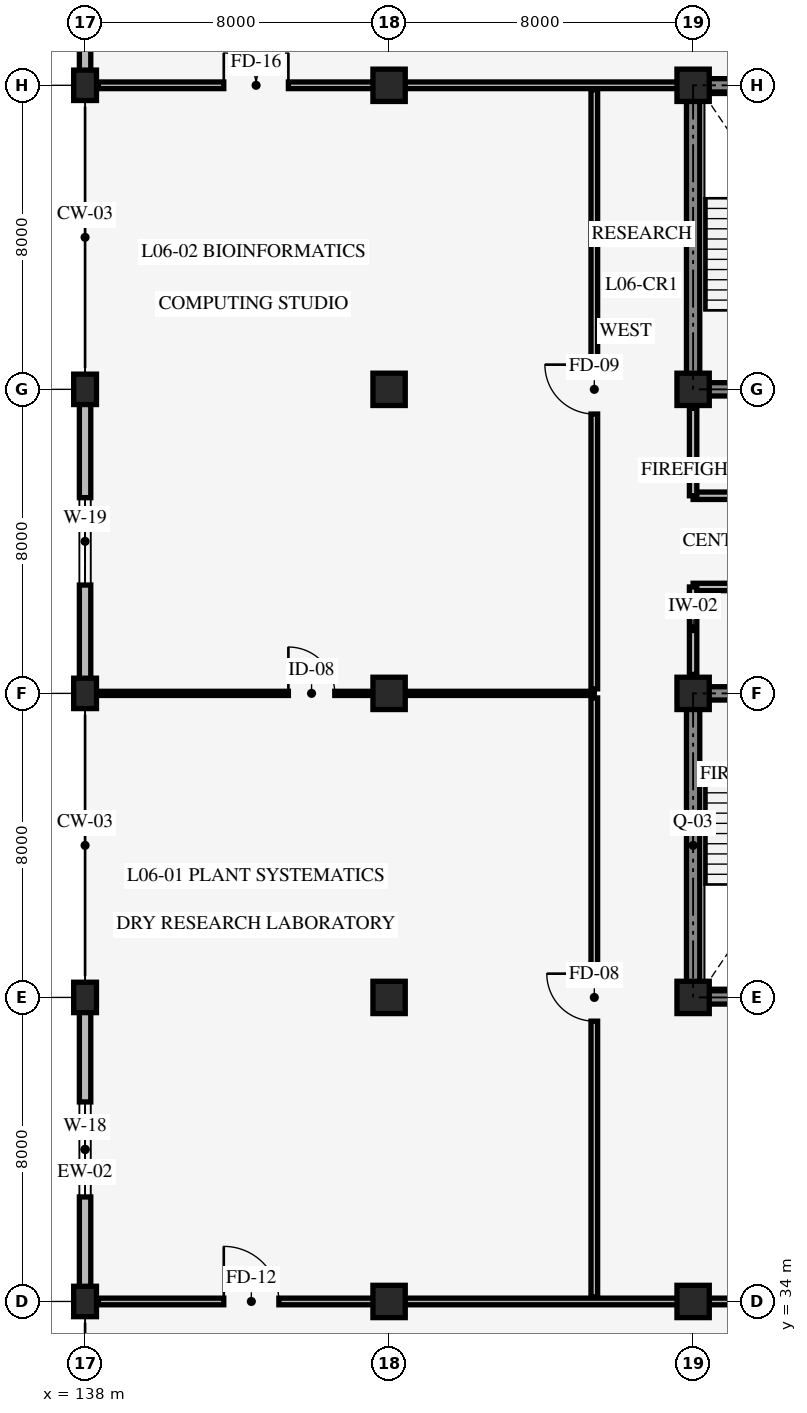
"""IFC4 building model, lengths in metres.
Left out: names, types, materials, properties, quantities, classifications, styles, units other than length and angle.
Written with IfcOpenShell. Run it as: python <this file> out.ifc"""

import sys

from ifc_helpers import new_model, si_unit, direction, frame, frame_2d, origin, origin_2d, place, context, subcontext, project, spatial, rectangle, extrude, element, fill, save


model = new_model("IFC4")
c1 = context("Model", 3, precision=1e-05, world=origin(), true_north=direction((0.0, 1.0)))
c2 = subcontext(c1, "Body", "Model", "MODEL_VIEW")
j1 = project(units=[si_unit("LENGTHUNIT", "METRE"), si_unit("PLANEANGLEUNIT", "RADIAN")], contexts=[c1])
p1 = place(None, origin())
s1 = spatial("IfcSite", under=j1, at=p1, CompositionType="ELEMENT")
p2 = place(p1, origin())
s2 = spatial("IfcBuilding", under=s1, at=p2, CompositionType="ELEMENT")
p3 = place(p2, frame((0.0, 0.0, 23.4)))
s3 = spatial("IfcBuildingStorey", under=s2, at=p3, CompositionType="ELEMENT", Elevation=23.4)
p4 = place(p3, frame((154.0, 42.0, 0.0), z_axis=(0.0, 0.0, 1.0), x_axis=(1.0, 0.0, 0.0)))
e1 = element("IfcWall", 1, at=p4, inside=s3, PredefinedType="SHEAR", context=c2, shape_type="SweptSolid", body=[
    extrude(rectangle(XDim=8.0, YDim=0.35, at=frame_2d((4.0, 0.0))), origin(), (0.0, 0.0, 1.0), 3.95),
])
p5 = place(p3, frame((162.0, 50.0, 0.0), z_axis=(0.0, 0.0, 1.0), x_axis=(-1.0, 0.0, 0.0)))
e2 = element("IfcWall", 2, at=p5, inside=s3, PredefinedType="SHEAR", context=c2, shape_type="SweptSolid", body=[
    extrude(rectangle(XDim=8.0, YDim=0.35, at=frame_2d((4.0, 0.0))), origin(), (0.0, 0.0, 1.0), 3.95),
])
p6 = place(p5, frame((5.3, 0.0, 0.0)))
e3 = element("IfcOpeningElement", 3, at=p6, cuts=e2, PredefinedType="OPENING", context=c2, shape_type="SweptSolid", body=[
    extrude(rectangle(XDim=1.3, YDim=2.15, at=frame_2d((0.65, 1.075))), frame((0.0, 0.185, 0.0), z_axis=(0.0, -1.0, 0.0), x_axis=(1.0, 0.0, 0.0)), (0.0, 0.0, 1.0), 0.37),
])
p7 = place(p5, frame((1.45, 0.0, 0.0)))
e4 = element("IfcOpeningElement", 4, at=p7, cuts=e2, PredefinedType="OPENING", context=c2, shape_type="SweptSolid", body=[
    extrude(rectangle(XDim=1.1, YDim=2.2, at=frame_2d((0.55, 1.1))), frame((0.0, 0.185, 0.0), z_axis=(0.0, -1.0, 0.0), x_axis=(1.0, 0.0, 0.0)), (0.0, 0.0, 1.0), 0.37),
])
p8 = place(p3, frame((154.0, 50.0, 0.0), z_axis=(0.0, 0.0, 1.0), x_axis=(0.0, -1.0, 0.0)))
e5 = element("IfcWall", 5, at=p8, inside=s3, PredefinedType="SHEAR", context=c2, shape_type="SweptSolid", body=[
    extrude(rectangle(XDim=8.0, YDim=0.35, at=frame_2d((4.0, 0.0))), origin(), (0.0, 0.0, 1.0), 3.95),
])
p9 = place(p3, frame((154.0, 58.0, 0.0), z_axis=(0.0, 0.0, 1.0), x_axis=(1.0, 0.0, 0.0)))
e6 = element("IfcWall", 6, at=p9, inside=s3, PredefinedType="SHEAR", context=c2, shape_type="SweptSolid", body=[
    extrude(rectangle(XDim=8.0, YDim=0.35, at=frame_2d((4.0, 0.0))), origin(), (0.0, 0.0, 1.0), 3.95),
])
p10 = place(p9, frame((1.4, 0.0, 0.0)))
e7 = element("IfcOpeningElement", 7, at=p10, cuts=e6, PredefinedType="OPENING", context=c2, shape_type="SweptSolid", body=[
    extrude(rectangle(XDim=1.3, YDim=2.15, at=frame_2d((0.65, 1.075))), frame((0.0, 0.185, 0.0), z_axis=(0.0, -1.0, 0.0), x_axis=(1.0, 0.0, 0.0)), (0.0, 0.0, 1.0), 0.37),
])
p11 = place(p9, frame((5.3, 0.0, 0.0)))
e8 = element("IfcOpeningElement", 8, at=p11, cuts=e6, PredefinedType="OPENING", context=c2, shape_type="SweptSolid", body=[
    extrude(rectangle(XDim=1.1, YDim=2.2, at=frame_2d((0.55, 1.1))), frame((0.0, 0.185, 0.0), z_axis=(0.0, -1.0, 0.0), x_axis=(1.0, 0.0, 0.0)), (0.0, 0.0, 1.0), 0.37),
])
for number, where, z_axis, x_axis in (
    (9, (162.0, 66.0, 0.0), (0.0, 0.0, 1.0), (-1.0, 0.0, 0.0)),
    (10, (154.0, 66.0, 0.0), (0.0, 0.0, 1.0), (0.0, -1.0, 0.0)),
):
    element("IfcWall", number, at=place(p3, frame(where, z_axis=z_axis, x_axis=x_axis)), inside=s3, PredefinedType="SHEAR", context=c2, shape_type="SweptSolid", body=[
        extrude(rectangle(XDim=8.0, YDim=0.35, at=frame_2d((4.0, 0.0))), origin(), (0.0, 0.0, 1.0), 3.95),
    ])
for number, where, z_axis, x_axis in (
    (11, (138.0, 34.0, 0.0), (0.0, 0.0, 1.0), (1.0, 0.0, 0.0)),
    (12, (138.0, 42.0, 0.0), (0.0, 0.0, 1.0), (1.0, 0.0, 0.0)),
    (13, (138.0, 50.0, 0.0), (0.0, 0.0, 1.0), (1.0, 0.0, 0.0)),
    (14, (138.0, 58.0, 0.0), (0.0, 0.0, 1.0), (1.0, 0.0, 0.0)),
    (15, (138.0, 66.0, 0.0), (0.0, 0.0, 1.0), (1.0, 0.0, 0.0)),
):
    element("IfcColumn", number, at=place(p3, frame(where, z_axis=z_axis, x_axis=x_axis)), inside=s3, PredefinedType="COLUMN", context=c2, shape_type="SweptSolid", body=[
        extrude(rectangle(XDim=0.6, YDim=0.8, at=origin_2d()), origin(), (0.0, 0.0, 1.0), 4.2),
    ])
for number, where, z_axis, x_axis in (
    (16, (146.0, 34.0, 0.0), (0.0, 0.0, 1.0), (1.0, 0.0, 0.0)),
    (17, (146.0, 42.0, 0.0), (0.0, 0.0, 1.0), (1.0, 0.0, 0.0)),
    (18, (146.0, 50.0, 0.0), (0.0, 0.0, 1.0), (1.0, 0.0, 0.0)),
    (19, (146.0, 58.0, 0.0), (0.0, 0.0, 1.0), (1.0, 0.0, 0.0)),
    (20, (146.0, 66.0, 0.0), (0.0, 0.0, 1.0), (1.0, 0.0, 0.0)),
    (21, (154.0, 34.0, 0.0), (0.0, 0.0, 1.0), (1.0, 0.0, 0.0)),
    (22, (154.0, 42.0, 0.0), (0.0, 0.0, 1.0), (1.0, 0.0, 0.0)),
    (23, (154.0, 50.0, 0.0), (0.0, 0.0, 1.0), (1.0, 0.0, 0.0)),
    (24, (154.0, 58.0, 0.0), (0.0, 0.0, 1.0), (1.0, 0.0, 0.0)),
    (25, (154.0, 66.0, 0.0), (0.0, 0.0, 1.0), (1.0, 0.0, 0.0)),
):
    element("IfcColumn", number, at=place(p3, frame(where, z_axis=z_axis, x_axis=x_axis)), inside=s3, PredefinedType="COLUMN", context=c2, shape_type="SweptSolid", body=[
        extrude(rectangle(XDim=0.85, YDim=0.85, at=origin_2d()), origin(), (0.0, 0.0, 1.0), 4.2),
    ])
p12 = place(p3, frame((138.0, 34.0, 0.0), z_axis=(0.0, 0.0, 1.0), x_axis=(0.0, 1.0, 0.0)))
e26 = element("IfcWall", 26, at=p12, inside=s3, PredefinedType="STANDARD", context=c2, shape_type="SweptSolid", body=[
    extrude(rectangle(XDim=8.0, YDim=0.3, at=frame_2d((4.0, 0.0))), origin(), (0.0, 0.0, 1.0), 3.19),
])
p13 = place(p12, frame((2.75, 0.0, 0.85)))
e27 = element("IfcOpeningElement", 27, at=p13, cuts=e26, PredefinedType="OPENING", context=c2, shape_type="SweptSolid", body=[
    extrude(rectangle(XDim=2.5, YDim=1.8, at=frame_2d((1.25, 0.9))), frame((0.0, 0.16, 0.0), z_axis=(0.0, -1.0, 0.0), x_axis=(1.0, 0.0, 0.0)), (0.0, 0.0, 1.0), 0.32),
])
p14 = place(p3, frame((138.0, 50.0, 0.0), z_axis=(0.0, 0.0, 1.0), x_axis=(0.0, 1.0, 0.0)))
e28 = element("IfcWall", 28, at=p14, inside=s3, PredefinedType="STANDARD", context=c2, shape_type="SweptSolid", body=[
    extrude(rectangle(XDim=8.0, YDim=0.3, at=frame_2d((4.0, 0.0))), origin(), (0.0, 0.0, 1.0), 3.19),
])
p15 = place(p14, frame((2.85, 0.0, 0.85)))
e29 = element("IfcOpeningElement", 29, at=p15, cuts=e28, PredefinedType="OPENING", context=c2, shape_type="SweptSolid", body=[
    extrude(rectangle(XDim=2.3, YDim=1.5, at=frame_2d((1.15, 0.75))), frame((0.0, 0.16, 0.0), z_axis=(0.0, -1.0, 0.0), x_axis=(1.0, 0.0, 0.0)), (0.0, 0.0, 1.0), 0.32),
])
p16 = place(p3, frame((138.0, 66.0, 0.0), z_axis=(0.0, 0.0, 1.0), x_axis=(0.0, 1.0, 0.0)))
e30 = element("IfcWall", 30, at=p16, inside=s3, PredefinedType="STANDARD", context=c2, shape_type="SweptSolid", body=[
    extrude(rectangle(XDim=8.0, YDim=0.3, at=frame_2d((4.0, 0.0))), origin(), (0.0, 0.0, 1.0), 3.19),
])
p17 = place(p16, frame((2.65, 0.0, 0.85)))
e31 = element("IfcOpeningElement", 31, at=p17, cuts=e30, PredefinedType="OPENING", context=c2, shape_type="SweptSolid", body=[
    extrude(rectangle(XDim=2.7, YDim=1.8, at=frame_2d((1.35, 0.9))), frame((0.0, 0.16, 0.0), z_axis=(0.0, -1.0, 0.0), x_axis=(1.0, 0.0, 0.0)), (0.0, 0.0, 1.0), 0.32),
])
p18 = place(p3, frame((154.0, 52.8, 0.0), z_axis=(0.0, 0.0, 1.0), x_axis=(1.0, 0.0, 0.0)))
e32 = element("IfcWall", 32, at=p18, inside=s3, PredefinedType="STANDARD", context=c2, shape_type="SweptSolid", body=[
    extrude(rectangle(XDim=7.6, YDim=0.195, at=frame_2d((3.8, 0.0))), origin(), (0.0, 0.0, 1.0), 3.9),
])
p19 = place(p18, frame((2.8, 0.0, 0.0)))
e33 = element("IfcOpeningElement", 33, at=p19, cuts=e32, PredefinedType="OPENING", context=c2, shape_type="SweptSolid", body=[
    extrude(rectangle(XDim=1.2, YDim=2.1, at=frame_2d((0.6, 1.05))), frame((0.0, 0.107, 0.0), z_axis=(0.0, -1.0, 0.0), x_axis=(1.0, 0.0, 0.0)), (0.0, 0.0, 1.0), 0.215),
])
p20 = place(p3, frame((154.0, 50.5, 0.0), z_axis=(0.0, 0.0, 1.0), x_axis=(0.0, 1.0, 0.0)))
e34 = element("IfcWall", 34, at=p20, inside=s3, PredefinedType="STANDARD", context=c2, shape_type="SweptSolid", body=[
    extrude(rectangle(XDim=2.3, YDim=0.195, at=frame_2d((1.15, 0.0))), origin(), (0.0, 0.0, 1.0), 3.19),
])
p21 = place(p3, frame((154.0, 55.2, 0.0), z_axis=(0.0, 0.0, 1.0), x_axis=(1.0, 0.0, 0.0)))
e35 = element("IfcWall", 35, at=p21, inside=s3, PredefinedType="STANDARD", context=c2, shape_type="SweptSolid", body=[
    extrude(rectangle(XDim=7.6, YDim=0.195, at=frame_2d((3.8, 0.0))), origin(), (0.0, 0.0, 1.0), 3.9),
])
p22 = place(p21, frame((2.8, 0.0, 0.0)))
e36 = element("IfcOpeningElement", 36, at=p22, cuts=e35, PredefinedType="OPENING", context=c2, shape_type="SweptSolid", body=[
    extrude(rectangle(XDim=1.3, YDim=2.15, at=frame_2d((0.65, 1.075))), frame((0.0, 0.107, 0.0), z_axis=(0.0, -1.0, 0.0), x_axis=(1.0, 0.0, 0.0)), (0.0, 0.0, 1.0), 0.215),
])
p23 = place(p3, frame((154.0, 55.2, 0.0), z_axis=(0.0, 0.0, 1.0), x_axis=(0.0, 1.0, 0.0)))
e37 = element("IfcWall", 37, at=p23, inside=s3, PredefinedType="STANDARD", context=c2, shape_type="SweptSolid", body=[
    extrude(rectangle(XDim=2.3, YDim=0.195, at=frame_2d((1.15, 0.0))), origin(), (0.0, 0.0, 1.0), 3.19),
])
p24 = place(p3, frame((151.4, 34.12, 0.0), z_axis=(0.0, 0.0, 1.0), x_axis=(0.0, 1.0, 0.0)))
e38 = element("IfcWall", 38, at=p24, inside=s3, PredefinedType="STANDARD", context=c2, shape_type="SweptSolid", body=[
    extrude(rectangle(XDim=15.76, YDim=0.175, at=frame_2d((7.88, 0.0))), origin(), (0.0, 0.0, 1.0), 3.9),
])
p25 = place(p24, frame((7.255, 0.0, 0.0)))
e39 = element("IfcOpeningElement", 39, at=p25, cuts=e38, PredefinedType="OPENING", context=c2, shape_type="SweptSolid", body=[
    extrude(rectangle(XDim=1.25, YDim=2.15, at=frame_2d((0.625, 1.075))), frame((0.0, 0.098, 0.0), z_axis=(0.0, -1.0, 0.0), x_axis=(1.0, 0.0, 0.0)), (0.0, 0.0, 1.0), 0.195),
])
p26 = place(p3, frame((138.12, 50.0, 0.0), z_axis=(0.0, 0.0, 1.0), x_axis=(1.0, 0.0, 0.0)))
e40 = element("IfcWall", 40, at=p26, inside=s3, PredefinedType="STANDARD", context=c2, shape_type="SweptSolid", body=[
    extrude(rectangle(XDim=13.28, YDim=0.11, at=frame_2d((6.64, 0.0))), origin(), (0.0, 0.0, 1.0), 3.14),
])
p27 = place(p26, frame((5.23, 0.0, 0.0)))
e41 = element("IfcOpeningElement", 41, at=p27, cuts=e40, PredefinedType="OPENING", context=c2, shape_type="SweptSolid", body=[
    extrude(rectangle(XDim=1.22, YDim=2.14, at=frame_2d((0.61, 1.07))), frame((0.0, 0.065, 0.0), z_axis=(0.0, -1.0, 0.0), x_axis=(1.0, 0.0, 0.0)), (0.0, 0.0, 1.0), 0.13),
])
p28 = place(p3, frame((151.4, 50.12, 0.0), z_axis=(0.0, 0.0, 1.0), x_axis=(0.0, 1.0, 0.0)))
e42 = element("IfcWall", 42, at=p28, inside=s3, PredefinedType="STANDARD", context=c2, shape_type="SweptSolid", body=[
    extrude(rectangle(XDim=15.76, YDim=0.175, at=frame_2d((7.88, 0.0))), origin(), (0.0, 0.0, 1.0), 3.9),
])
p29 = place(p28, frame((7.23, 0.0, 0.0)))
e43 = element("IfcOpeningElement", 43, at=p29, cuts=e42, PredefinedType="OPENING", context=c2, shape_type="SweptSolid", body=[
    extrude(rectangle(XDim=1.3, YDim=2.15, at=frame_2d((0.65, 1.075))), frame((0.0, 0.098, 0.0), z_axis=(0.0, -1.0, 0.0), x_axis=(1.0, 0.0, 0.0)), (0.0, 0.0, 1.0), 0.195),
])
p30 = place(p3, frame((138.35, 34.0, 0.0), z_axis=(0.0, 0.0, 1.0), x_axis=(1.0, 0.0, 0.0)))
e44 = element("IfcWall", 44, at=p30, inside=s3, PredefinedType="STANDARD", context=c2, shape_type="SweptSolid", body=[
    extrude(rectangle(XDim=23.3, YDim=0.175, at=frame_2d((11.65, 0.0))), origin(), (0.0, 0.0, 1.0), 3.14),
])
p31 = place(p30, frame((3.3, 0.0, 0.0)))
e45 = element("IfcOpeningElement", 45, at=p31, cuts=e44, PredefinedType="OPENING", context=c2, shape_type="SweptSolid", body=[
    extrude(rectangle(XDim=1.45, YDim=2.2, at=frame_2d((0.725, 1.1))), frame((0.0, 0.098, 0.0), z_axis=(0.0, -1.0, 0.0), x_axis=(1.0, 0.0, 0.0)), (0.0, 0.0, 1.0), 0.195),
])
p32 = place(p3, frame((138.35, 66.0, 0.0), z_axis=(0.0, 0.0, 1.0), x_axis=(1.0, 0.0, 0.0)))
e46 = element("IfcWall", 46, at=p32, inside=s3, PredefinedType="STANDARD", context=c2, shape_type="SweptSolid", body=[
    extrude(rectangle(XDim=15.3, YDim=0.175, at=frame_2d((7.65, 0.0))), origin(), (0.0, 0.0, 1.0), 3.14),
])
p33 = place(p32, frame((3.3, 0.0, 0.0)))
e47 = element("IfcOpeningElement", 47, at=p33, cuts=e46, PredefinedType="OPENING", context=c2, shape_type="SweptSolid", body=[
    extrude(rectangle(XDim=1.7, YDim=2.3, at=frame_2d((0.85, 1.15))), frame((0.0, 0.098, 0.0), z_axis=(0.0, -1.0, 0.0), x_axis=(1.0, 0.0, 0.0)), (0.0, 0.0, 1.0), 0.195),
])
p34 = place(p13, origin())
e48 = element("IfcWindow", 48, at=p34, inside=s3, PartitioningType="SINGLE_PANEL", PredefinedType="WINDOW", context=c2, shape_type="SweptSolid", body=[
    extrude(rectangle(XDim=2.5, YDim=1.8, at=frame_2d((1.25, 0.9))), frame((0.0, 0.03, 0.0), z_axis=(0.0, -1.0, 0.0), x_axis=(1.0, 0.0, 0.0)), (0.0, 0.0, 1.0), 0.06),
])
fill(e27, e48)
p35 = place(p15, origin())
e49 = element("IfcWindow", 49, at=p35, inside=s3, PartitioningType="SINGLE_PANEL", PredefinedType="WINDOW", context=c2, shape_type="SweptSolid", body=[
    extrude(rectangle(XDim=2.3, YDim=1.5, at=frame_2d((1.15, 0.75))), frame((0.0, 0.03, 0.0), z_axis=(0.0, -1.0, 0.0), x_axis=(1.0, 0.0, 0.0)), (0.0, 0.0, 1.0), 0.06),
])
fill(e29, e49)
p36 = place(p25, origin())
e50 = element("IfcDoor", 50, at=p36, inside=s3, OperationType="SINGLE_SWING_RIGHT", PredefinedType="DOOR", context=c2, shape_type="SweptSolid", body=[
    extrude(rectangle(XDim=1.25, YDim=2.15, at=frame_2d((0.625, 1.075))), frame((0.0, 0.025, 0.0), z_axis=(0.0, -1.0, 0.0), x_axis=(1.0, 0.0, 0.0)), (0.0, 0.0, 1.0), 0.05),
])
fill(e39, e50)
p37 = place(p27, origin())
e51 = element("IfcDoor", 51, at=p37, inside=s3, OperationType="SINGLE_SWING_LEFT", PredefinedType="DOOR", context=c2, shape_type="SweptSolid", body=[
    extrude(rectangle(XDim=1.22, YDim=2.14, at=frame_2d((0.61, 1.07))), frame((0.0, 0.025, 0.0), z_axis=(0.0, -1.0, 0.0), x_axis=(1.0, 0.0, 0.0)), (0.0, 0.0, 1.0), 0.05),
])
fill(e41, e51)
p38 = place(p29, origin())
e52 = element("IfcDoor", 52, at=p38, inside=s3, OperationType="SINGLE_SWING_RIGHT", PredefinedType="DOOR", context=c2, shape_type="SweptSolid", body=[
    extrude(rectangle(XDim=1.3, YDim=2.15, at=frame_2d((0.65, 1.075))), frame((0.0, 0.025, 0.0), z_axis=(0.0, -1.0, 0.0), x_axis=(1.0, 0.0, 0.0)), (0.0, 0.0, 1.0), 0.05),
])
fill(e43, e52)
p39 = place(p31, origin())
e53 = element("IfcDoor", 53, at=p39, inside=s3, OperationType="SINGLE_SWING_LEFT", PredefinedType="DOOR", context=c2, shape_type="SweptSolid", body=[
    extrude(rectangle(XDim=1.45, YDim=2.2, at=frame_2d((0.725, 1.1))), frame((0.0, 0.025, 0.0), z_axis=(0.0, -1.0, 0.0), x_axis=(1.0, 0.0, 0.0)), (0.0, 0.0, 1.0), 0.05),
])
fill(e45, e53)
p40 = place(p33, origin())
e54 = element("IfcDoor", 54, at=p40, inside=s3, OperationType="DOUBLE_DOOR_SINGLE_SWING", PredefinedType="DOOR", context=c2, shape_type="SweptSolid", body=[
    extrude(rectangle(XDim=1.7, YDim=2.3, at=frame_2d((0.85, 1.15))), frame((0.0, 0.025, 0.0), z_axis=(0.0, -1.0, 0.0), x_axis=(1.0, 0.0, 0.0)), (0.0, 0.0, 1.0), 0.05),
])
fill(e47, e54)
save(model, sys.argv[1])
